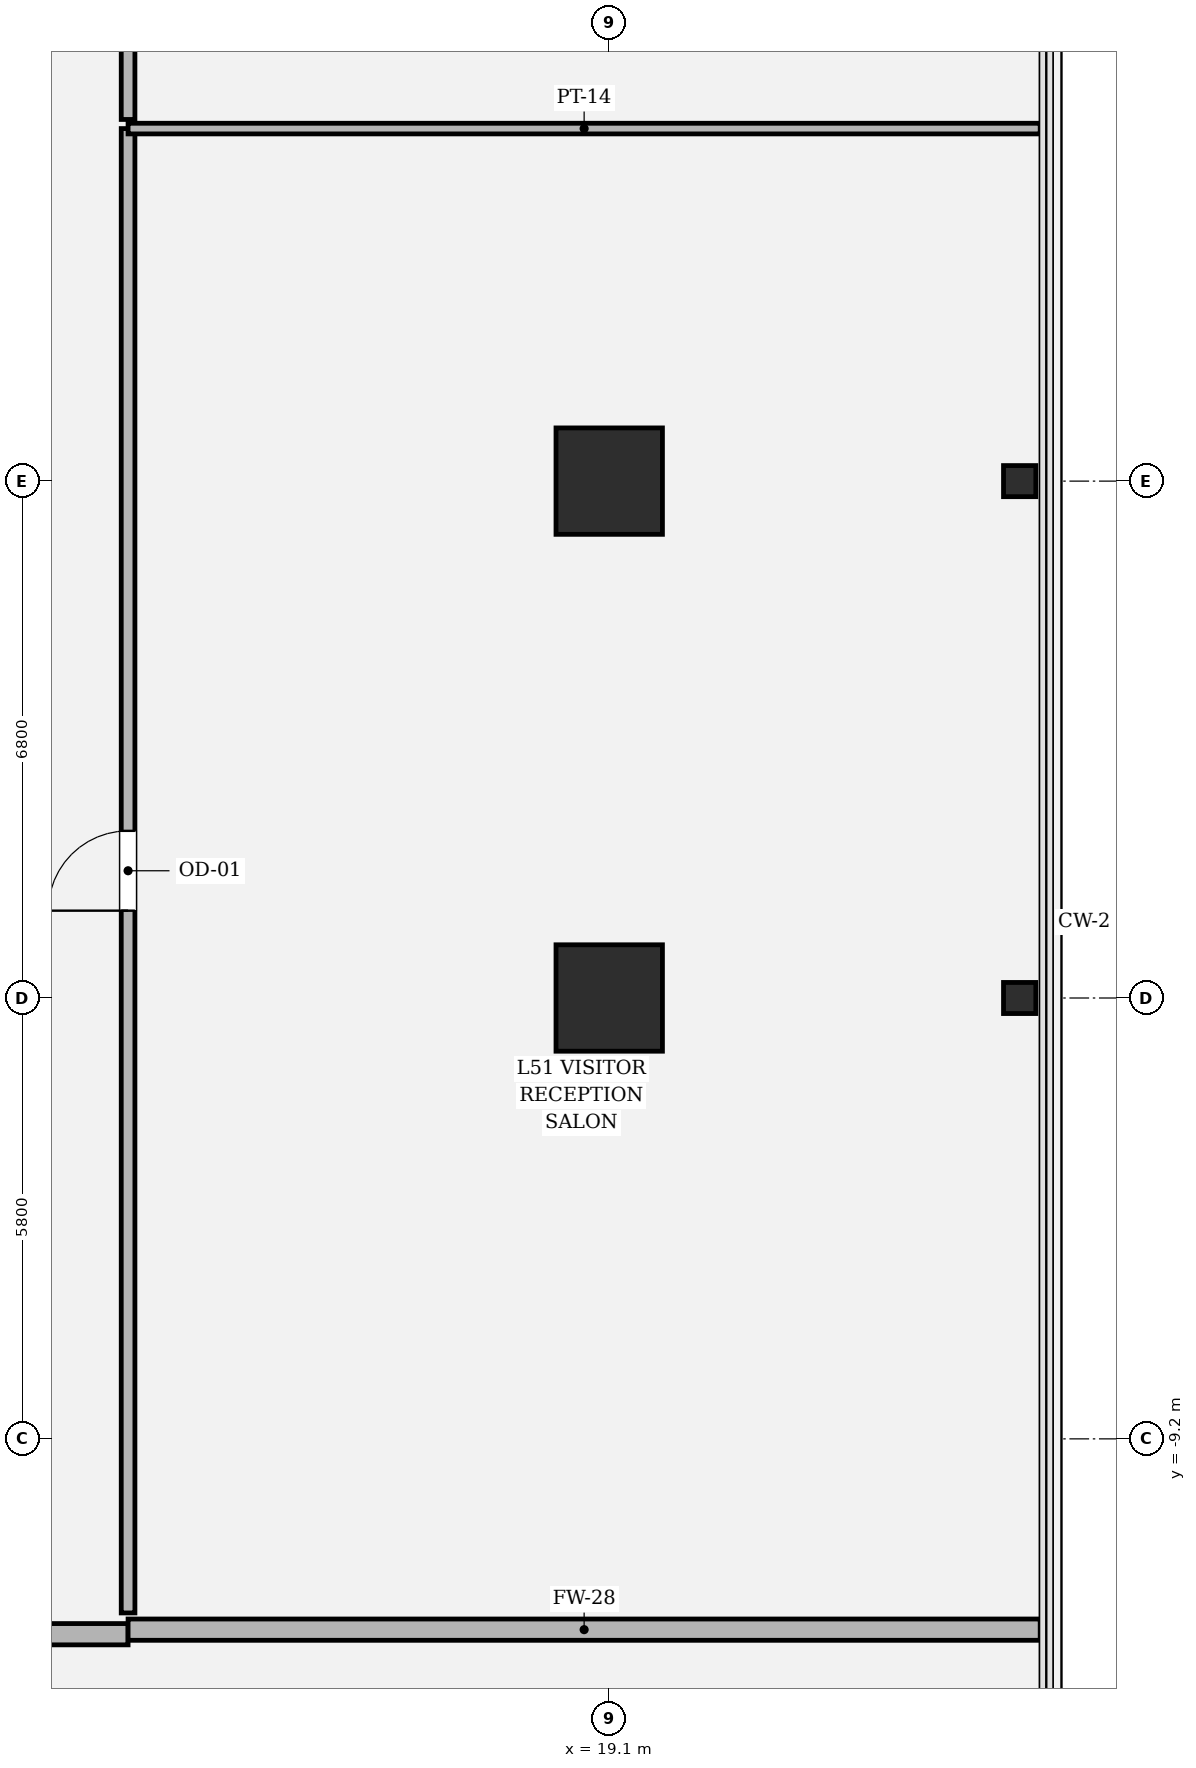
"""IFC4 building model, lengths in metres.
Left out: names, types, materials, properties, quantities, classifications, styles, units other than length and angle.
Written with IfcOpenShell. Run it as: python <this file> out.ifc"""

import sys

from ifc_helpers import new_model, si_unit, direction, frame, frame_2d, origin, origin_2d, place, context, subcontext, project, spatial, rectangle, hollow_rectangle, i_section, extrude, element, fill, save


model = new_model("IFC4")
c1 = context("Model", 3, precision=1e-05, world=origin(), true_north=direction((0.0, 1.0)))
c2 = subcontext(c1, "Body", "Model", "MODEL_VIEW")
j1 = project(units=[si_unit("LENGTHUNIT", "METRE"), si_unit("PLANEANGLEUNIT", "RADIAN")], contexts=[c1])
p1 = place(None, origin())
s1 = spatial("IfcSite", under=j1, at=p1, CompositionType="ELEMENT")
p2 = place(p1, origin())
s2 = spatial("IfcBuilding", under=s1, at=p2, CompositionType="ELEMENT")
p3 = place(p2, frame((0.0, 0.0, 216.75)))
s3 = spatial("IfcBuildingStorey", under=s2, at=p3, CompositionType="ELEMENT", Elevation=216.75)
for number, where, z_axis, x_axis in (
    (1, (19.1, -3.4, 0.0), (0.0, 0.0, 1.0), (1.0, 0.0, 0.0)),
    (2, (19.1, 3.4, 0.0), (0.0, 0.0, 1.0), (1.0, 0.0, 0.0)),
):
    element("IfcColumn", number, at=place(p3, frame(where, z_axis=z_axis, x_axis=x_axis)), inside=s3, PredefinedType="COLUMN", context=c2, shape_type="SweptSolid", body=[
        extrude(hollow_rectangle(XDim=1.4, YDim=1.4, WallThickness=0.042, at=origin_2d()), origin(), (0.0, 0.0, 1.0), 4.05),
    ])
for number, where, z_axis, x_axis in (
    (3, (24.5, -3.4, 0.0), (0.0, 0.0, 1.0), (0.0, 1.0, 0.0)),
    (4, (24.5, 3.4, 0.0), (0.0, 0.0, 1.0), (0.0, 1.0, 0.0)),
):
    element("IfcColumn", number, at=place(p3, frame(where, z_axis=z_axis, x_axis=x_axis)), inside=s3, PredefinedType="COLUMN", context=c2, shape_type="SweptSolid", body=[
        extrude(i_section(OverallWidth=0.409, OverallDepth=0.425, WebThickness=0.032, FlangeThickness=0.052, FilletRadius=0.018, at=origin_2d()), origin(), (0.0, 0.0, 1.0), 4.048),
    ])
p4 = place(p3, frame((2.46, -11.77, 0.0), z_axis=(0.0, 0.0, 1.0), x_axis=(1.0, 0.0, 0.0)))
e5 = element("IfcWall", 5, at=p4, inside=s3, PredefinedType="SOLIDWALL", context=c2, shape_type="SweptSolid", body=[
    extrude(rectangle(XDim=10.31, YDim=0.28, at=frame_2d((5.155, 0.0))), origin(), (0.0, 0.0, 1.0), 2.504),
])
p5 = place(p4, frame((4.305, 0.0, 0.0)))
e6 = element("IfcOpeningElement", 6, at=p5, cuts=e5, PredefinedType="OPENING", context=c2, shape_type="SweptSolid", body=[
    extrude(rectangle(XDim=1.7, YDim=2.3, at=frame_2d((0.85, 1.15))), frame((0.0, 0.15, 0.0), z_axis=(0.0, -1.0, 0.0), x_axis=(1.0, 0.0, 0.0)), (0.0, 0.0, 1.0), 0.3),
])
p6 = place(p3, frame((12.77, -11.71, 0.0), z_axis=(0.0, 0.0, 1.0), x_axis=(1.0, 0.0, 0.0)))
e7 = element("IfcWall", 7, at=p6, inside=s3, PredefinedType="SOLIDWALL", context=c2, shape_type="SweptSolid", body=[
    extrude(rectangle(XDim=12.0, YDim=0.28, at=frame_2d((6.0, 0.0))), origin(), (0.0, 0.0, 1.0), 2.504),
])
p7 = place(p3, frame((12.77, -11.49, 0.0), z_axis=(0.0, 0.0, 1.0), x_axis=(0.0, 1.0, 0.0)))
e8 = element("IfcWall", 8, at=p7, inside=s3, PredefinedType="PARTITIONING", context=c2, shape_type="SweptSolid", body=[
    extrude(rectangle(XDim=19.528, YDim=0.18, at=frame_2d((9.764, 0.0))), origin(), (0.0, 0.0, 1.0), 2.504),
])
p8 = place(p7, frame((9.239, 0.0, 0.0)))
e9 = element("IfcOpeningElement", 9, at=p8, cuts=e8, PredefinedType="OPENING", context=c2, shape_type="SweptSolid", body=[
    extrude(rectangle(XDim=1.05, YDim=2.2, at=frame_2d((0.525, 1.1))), frame((0.0, 0.1, 0.0), z_axis=(0.0, -1.0, 0.0), x_axis=(1.0, 0.0, 0.0)), (0.0, 0.0, 1.0), 0.2),
])
p9 = place(p3, frame((12.77, 8.038, 0.0), z_axis=(0.0, 0.0, 1.0), x_axis=(1.0, 0.0, 0.0)))
e10 = element("IfcWall", 10, at=p9, inside=s3, PredefinedType="PARTITIONING", context=c2, shape_type="SweptSolid", body=[
    extrude(rectangle(XDim=12.0, YDim=0.14, at=frame_2d((6.0, 0.0))), origin(), (0.0, 0.0, 1.0), 2.504),
])
p10 = place(p3, frame((12.77, 8.158, 0.0), z_axis=(0.0, 0.0, 1.0), x_axis=(0.0, 1.0, 0.0)))
e11 = element("IfcWall", 11, at=p10, inside=s3, PredefinedType="PARTITIONING", context=c2, shape_type="SweptSolid", body=[
    extrude(rectangle(XDim=10.212, YDim=0.18, at=frame_2d((5.106, 0.0))), origin(), (0.0, 0.0, 1.0), 2.504),
])
p11 = place(p10, frame((4.581, 0.0, 0.0)))
e12 = element("IfcOpeningElement", 12, at=p11, cuts=e11, PredefinedType="OPENING", context=c2, shape_type="SweptSolid", body=[
    extrude(rectangle(XDim=1.05, YDim=2.2, at=frame_2d((0.525, 1.1))), frame((0.0, 0.1, 0.0), z_axis=(0.0, -1.0, 0.0), x_axis=(1.0, 0.0, 0.0)), (0.0, 0.0, 1.0), 0.2),
])
p12 = place(p8, origin())
e13 = element("IfcDoor", 13, at=p12, inside=s3, OperationType="SINGLE_SWING_LEFT", PredefinedType="DOOR", context=c2, shape_type="SweptSolid", body=[
    extrude(rectangle(XDim=1.05, YDim=2.2, at=frame_2d((0.525, 1.1))), frame((0.0, 0.025, 0.0), z_axis=(0.0, -1.0, 0.0), x_axis=(1.0, 0.0, 0.0)), (0.0, 0.0, 1.0), 0.05),
])
fill(e9, e13)
save(model, sys.argv[1])
